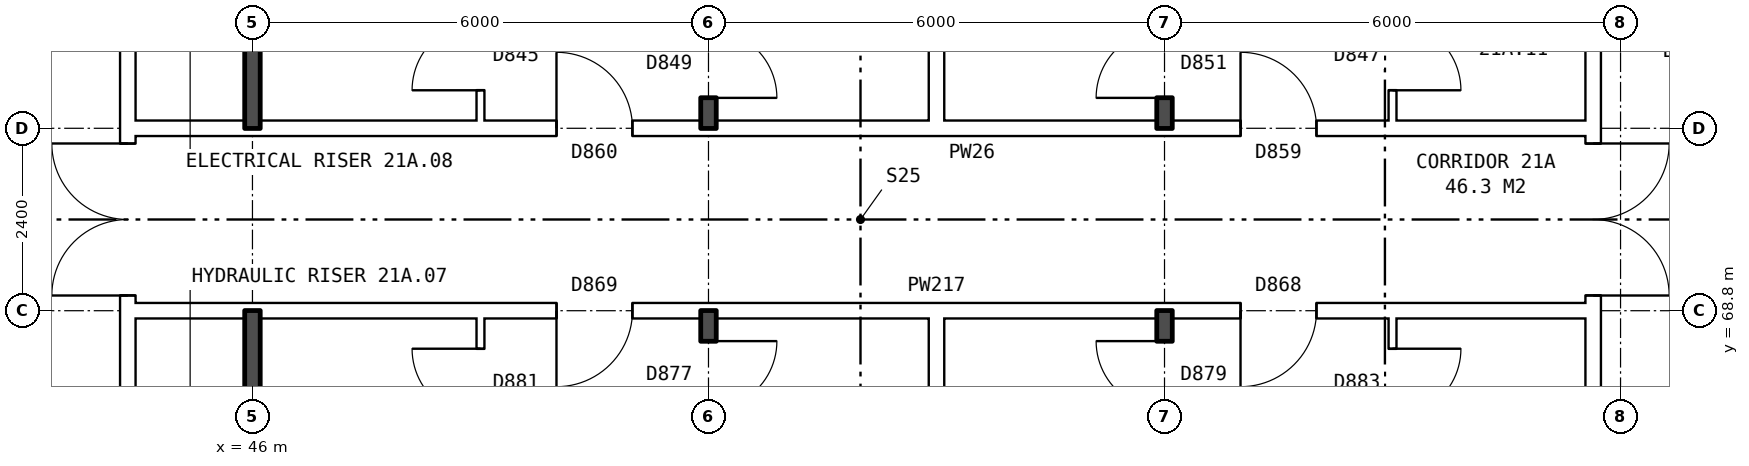
"""IFC4 building model, lengths in metres.
Left out: names, types, materials, properties, quantities, classifications, styles, units other than length and angle.
Written with IfcOpenShell. Run it as: python <this file> out.ifc"""

import sys

from ifc_helpers import new_model, si_unit, direction, frame, frame_2d, origin, place, context, subcontext, project, spatial, rectangle, extrude, element, fill, save


model = new_model("IFC4")
c1 = context("Model", 3, precision=1e-05, world=origin(), true_north=direction((0.0, 1.0)))
c2 = subcontext(c1, "Body", "Model", "MODEL_VIEW")
j1 = project(units=[si_unit("LENGTHUNIT", "METRE"), si_unit("PLANEANGLEUNIT", "RADIAN")], contexts=[c1])
p1 = place(None, origin())
s1 = spatial("IfcSite", under=j1, at=p1, CompositionType="ELEMENT")
p2 = place(p1, origin())
s2 = spatial("IfcBuilding", under=s1, at=p2, CompositionType="ELEMENT")
p3 = place(p2, frame((0.0, 0.0, 77.8)))
s3 = spatial("IfcBuildingStorey", under=s2, at=p3, CompositionType="ELEMENT", Elevation=77.8)
p4 = place(p3, frame((63.64, 63.9, 0.0), z_axis=(0.0, 0.0, 1.0), x_axis=(0.0, 1.0, 0.0)))
e1 = element("IfcWall", 1, at=p4, inside=s3, PredefinedType="PARTITIONING", context=c2, shape_type="SweptSolid", body=[
    extrude(rectangle(XDim=12.2, YDim=0.2, at=frame_2d((6.1, 0.0))), origin(), (0.0, 0.0, 1.0), 2.85),
])
p5 = place(p4, frame((5.1, 0.0, 0.0)))
e2 = element("IfcOpeningElement", 2, at=p5, cuts=e1, PredefinedType="OPENING", context=c2, shape_type="SweptSolid", body=[
    extrude(rectangle(XDim=2.0, YDim=2.1, at=frame_2d((1.0, 1.05))), frame((0.0, 0.11, 0.0), z_axis=(0.0, -1.0, 0.0), x_axis=(1.0, 0.0, 0.0)), (0.0, 0.0, 1.0), 0.22),
])
p6 = place(p3, frame((44.36, 63.9, 0.0), z_axis=(0.0, 0.0, 1.0), x_axis=(0.0, 1.0, 0.0)))
e3 = element("IfcWall", 3, at=p6, inside=s3, PredefinedType="PARTITIONING", context=c2, shape_type="SweptSolid", body=[
    extrude(rectangle(XDim=12.2, YDim=0.2, at=frame_2d((6.1, 0.0))), origin(), (0.0, 0.0, 1.0), 2.85),
])
p7 = place(p6, frame((5.1, 0.0, 0.0)))
e4 = element("IfcOpeningElement", 4, at=p7, cuts=e3, PredefinedType="OPENING", context=c2, shape_type="SweptSolid", body=[
    extrude(rectangle(XDim=2.0, YDim=2.1, at=frame_2d((1.0, 1.05))), frame((0.0, 0.11, 0.0), z_axis=(0.0, -1.0, 0.0), x_axis=(1.0, 0.0, 0.0)), (0.0, 0.0, 1.0), 0.22),
])
p8 = place(p3, frame((44.36, 68.8, 0.0), z_axis=(0.0, 0.0, 1.0), x_axis=(1.0, 0.0, 0.0)))
e5 = element("IfcWall", 5, at=p8, inside=s3, PredefinedType="PARTITIONING", context=c2, shape_type="SweptSolid", body=[
    extrude(rectangle(XDim=19.28, YDim=0.2, at=frame_2d((9.64, 0.0))), origin(), (0.0, 0.0, 1.0), 2.85),
])
p9 = place(p8, frame((14.64, 0.0, 0.0)))
e6 = element("IfcOpeningElement", 6, at=p9, cuts=e5, PredefinedType="OPENING", context=c2, shape_type="SweptSolid", body=[
    extrude(rectangle(XDim=1.0, YDim=2.1, at=frame_2d((0.5, 1.05))), frame((0.0, 0.11, 0.0), z_axis=(0.0, -1.0, 0.0), x_axis=(1.0, 0.0, 0.0)), (0.0, 0.0, 1.0), 0.22),
])
p10 = place(p8, frame((5.64, 0.0, 0.0)))
e7 = element("IfcOpeningElement", 7, at=p10, cuts=e5, PredefinedType="OPENING", context=c2, shape_type="SweptSolid", body=[
    extrude(rectangle(XDim=1.0, YDim=2.1, at=frame_2d((0.5, 1.05))), frame((0.0, 0.11, 0.0), z_axis=(0.0, -1.0, 0.0), x_axis=(1.0, 0.0, 0.0)), (0.0, 0.0, 1.0), 0.22),
])
p11 = place(p3, frame((44.36, 71.2, 0.0), z_axis=(0.0, 0.0, 1.0), x_axis=(1.0, 0.0, 0.0)))
e8 = element("IfcWall", 8, at=p11, inside=s3, PredefinedType="PARTITIONING", context=c2, shape_type="SweptSolid", body=[
    extrude(rectangle(XDim=19.28, YDim=0.2, at=frame_2d((9.64, 0.0))), origin(), (0.0, 0.0, 1.0), 2.85),
])
p12 = place(p11, frame((14.64, 0.0, 0.0)))
e9 = element("IfcOpeningElement", 9, at=p12, cuts=e8, PredefinedType="OPENING", context=c2, shape_type="SweptSolid", body=[
    extrude(rectangle(XDim=1.0, YDim=2.1, at=frame_2d((0.5, 1.05))), frame((0.0, 0.11, 0.0), z_axis=(0.0, -1.0, 0.0), x_axis=(1.0, 0.0, 0.0)), (0.0, 0.0, 1.0), 0.22),
])
p13 = place(p11, frame((5.64, 0.0, 0.0)))
e10 = element("IfcOpeningElement", 10, at=p13, cuts=e8, PredefinedType="OPENING", context=c2, shape_type="SweptSolid", body=[
    extrude(rectangle(XDim=1.0, YDim=2.1, at=frame_2d((0.5, 1.05))), frame((0.0, 0.11, 0.0), z_axis=(0.0, -1.0, 0.0), x_axis=(1.0, 0.0, 0.0)), (0.0, 0.0, 1.0), 0.22),
])
for number, where, z_axis, x_axis in (
    (11, (46.0, 63.8, 0.0), (0.0, 0.0, 1.0), (0.0, 1.0, 0.0)),
    (12, (46.0, 71.2, 0.0), (0.0, 0.0, 1.0), (0.0, 1.0, 0.0)),
):
    element("IfcWall", number, at=place(p3, frame(where, z_axis=z_axis, x_axis=x_axis)), inside=s3, PredefinedType="SOLIDWALL", context=c2, shape_type="SweptSolid", body=[
        extrude(rectangle(XDim=5.0, YDim=0.2, at=frame_2d((2.5, 0.0))), origin(), (0.0, 0.0, 1.0), 2.85),
    ])
p14 = place(p3, frame((49.0, 54.36, 0.0), z_axis=(0.0, 0.0, 1.0), x_axis=(0.0, 1.0, 0.0)))
e13 = element("IfcWall", 13, at=p14, inside=s3, PredefinedType="PARTITIONING", context=c2, shape_type="SweptSolid", body=[
    extrude(rectangle(XDim=14.34, YDim=0.1, at=frame_2d((7.17, 0.0))), origin(), (0.0, 0.0, 1.0), 2.85),
])
p15 = place(p14, frame((6.7, 0.0, 0.0)))
e14 = element("IfcOpeningElement", 14, at=p15, cuts=e13, PredefinedType="OPENING", context=c2, shape_type="SweptSolid", body=[
    extrude(rectangle(XDim=0.9, YDim=2.1, at=frame_2d((0.45, 1.05))), frame((0.0, 0.06, 0.0), z_axis=(0.0, -1.0, 0.0), x_axis=(1.0, 0.0, 0.0)), (0.0, 0.0, 1.0), 0.12),
])
p16 = place(p14, frame((13.04, 0.0, 0.0)))
e15 = element("IfcOpeningElement", 15, at=p16, cuts=e13, PredefinedType="OPENING", context=c2, shape_type="SweptSolid", body=[
    extrude(rectangle(XDim=0.9, YDim=2.1, at=frame_2d((0.45, 1.05))), frame((0.0, 0.06, 0.0), z_axis=(0.0, -1.0, 0.0), x_axis=(1.0, 0.0, 0.0)), (0.0, 0.0, 1.0), 0.12),
])
p17 = place(p3, frame((49.0, 71.3, 0.0), z_axis=(0.0, 0.0, 1.0), x_axis=(0.0, 1.0, 0.0)))
e16 = element("IfcWall", 16, at=p17, inside=s3, PredefinedType="PARTITIONING", context=c2, shape_type="SweptSolid", body=[
    extrude(rectangle(XDim=14.34, YDim=0.1, at=frame_2d((7.17, 0.0))), origin(), (0.0, 0.0, 1.0), 2.85),
])
p18 = place(p17, frame((5.74, 0.0, 0.0)))
e17 = element("IfcOpeningElement", 17, at=p18, cuts=e16, PredefinedType="OPENING", context=c2, shape_type="SweptSolid", body=[
    extrude(rectangle(XDim=0.9, YDim=2.1, at=frame_2d((0.45, 1.05))), frame((0.0, 0.06, 0.0), z_axis=(0.0, -1.0, 0.0), x_axis=(1.0, 0.0, 0.0)), (0.0, 0.0, 1.0), 0.12),
])
p19 = place(p17, frame((0.4, 0.0, 0.0)))
e18 = element("IfcOpeningElement", 18, at=p19, cuts=e16, PredefinedType="OPENING", context=c2, shape_type="SweptSolid", body=[
    extrude(rectangle(XDim=0.9, YDim=2.1, at=frame_2d((0.45, 1.05))), frame((0.0, 0.06, 0.0), z_axis=(0.0, -1.0, 0.0), x_axis=(1.0, 0.0, 0.0)), (0.0, 0.0, 1.0), 0.12),
])
p20 = place(p3, frame((52.0, 54.36, 0.0), z_axis=(0.0, 0.0, 1.0), x_axis=(0.0, 1.0, 0.0)))
e19 = element("IfcWall", 19, at=p20, inside=s3, PredefinedType="SOLIDWALL", context=c2, shape_type="SweptSolid", body=[
    extrude(rectangle(XDim=14.44, YDim=0.2, at=frame_2d((7.22, 0.0))), origin(), (0.0, 0.0, 1.0), 2.85),
])
p21 = place(p20, frame((6.7, 0.0, 0.0)))
e20 = element("IfcOpeningElement", 20, at=p21, cuts=e19, PredefinedType="OPENING", context=c2, shape_type="SweptSolid", body=[
    extrude(rectangle(XDim=0.9, YDim=2.1, at=frame_2d((0.45, 1.05))), frame((0.0, 0.11, 0.0), z_axis=(0.0, -1.0, 0.0), x_axis=(1.0, 0.0, 0.0)), (0.0, 0.0, 1.0), 0.22),
])
p22 = place(p20, frame((13.14, 0.0, 0.0)))
e21 = element("IfcOpeningElement", 21, at=p22, cuts=e19, PredefinedType="OPENING", context=c2, shape_type="SweptSolid", body=[
    extrude(rectangle(XDim=0.9, YDim=2.1, at=frame_2d((0.45, 1.05))), frame((0.0, 0.11, 0.0), z_axis=(0.0, -1.0, 0.0), x_axis=(1.0, 0.0, 0.0)), (0.0, 0.0, 1.0), 0.22),
])
p23 = place(p3, frame((52.0, 71.2, 0.0), z_axis=(0.0, 0.0, 1.0), x_axis=(0.0, 1.0, 0.0)))
e22 = element("IfcWall", 22, at=p23, inside=s3, PredefinedType="SOLIDWALL", context=c2, shape_type="SweptSolid", body=[
    extrude(rectangle(XDim=14.44, YDim=0.2, at=frame_2d((7.22, 0.0))), origin(), (0.0, 0.0, 1.0), 2.85),
])
p24 = place(p23, frame((5.84, 0.0, 0.0)))
e23 = element("IfcOpeningElement", 23, at=p24, cuts=e22, PredefinedType="OPENING", context=c2, shape_type="SweptSolid", body=[
    extrude(rectangle(XDim=0.9, YDim=2.1, at=frame_2d((0.45, 1.05))), frame((0.0, 0.11, 0.0), z_axis=(0.0, -1.0, 0.0), x_axis=(1.0, 0.0, 0.0)), (0.0, 0.0, 1.0), 0.22),
])
p25 = place(p23, frame((0.4, 0.0, 0.0)))
e24 = element("IfcOpeningElement", 24, at=p25, cuts=e22, PredefinedType="OPENING", context=c2, shape_type="SweptSolid", body=[
    extrude(rectangle(XDim=0.9, YDim=2.1, at=frame_2d((0.45, 1.05))), frame((0.0, 0.11, 0.0), z_axis=(0.0, -1.0, 0.0), x_axis=(1.0, 0.0, 0.0)), (0.0, 0.0, 1.0), 0.22),
])
for number, where, z_axis, x_axis in (
    (25, (55.0, 54.36, 0.0), (0.0, 0.0, 1.0), (0.0, 1.0, 0.0)),
    (26, (55.0, 71.3, 0.0), (0.0, 0.0, 1.0), (0.0, 1.0, 0.0)),
):
    element("IfcWall", number, at=place(p3, frame(where, z_axis=z_axis, x_axis=x_axis)), inside=s3, PredefinedType="PARTITIONING", context=c2, shape_type="SweptSolid", body=[
        extrude(rectangle(XDim=14.34, YDim=0.2, at=frame_2d((7.17, 0.0))), origin(), (0.0, 0.0, 1.0), 2.85),
    ])
p26 = place(p3, frame((58.0, 54.36, 0.0), z_axis=(0.0, 0.0, 1.0), x_axis=(0.0, 1.0, 0.0)))
e27 = element("IfcWall", 27, at=p26, inside=s3, PredefinedType="SOLIDWALL", context=c2, shape_type="SweptSolid", body=[
    extrude(rectangle(XDim=14.44, YDim=0.2, at=frame_2d((7.22, 0.0))), origin(), (0.0, 0.0, 1.0), 2.85),
])
p27 = place(p26, frame((7.7, 0.0, 0.0)))
e28 = element("IfcOpeningElement", 28, at=p27, cuts=e27, PredefinedType="OPENING", context=c2, shape_type="SweptSolid", body=[
    extrude(rectangle(XDim=0.9, YDim=2.1, at=frame_2d((0.45, 1.05))), frame((0.0, 0.11, 0.0), z_axis=(0.0, -1.0, 0.0), x_axis=(1.0, 0.0, 0.0)), (0.0, 0.0, 1.0), 0.22),
])
p28 = place(p26, frame((13.14, 0.0, 0.0)))
e29 = element("IfcOpeningElement", 29, at=p28, cuts=e27, PredefinedType="OPENING", context=c2, shape_type="SweptSolid", body=[
    extrude(rectangle(XDim=0.9, YDim=2.1, at=frame_2d((0.45, 1.05))), frame((0.0, 0.11, 0.0), z_axis=(0.0, -1.0, 0.0), x_axis=(1.0, 0.0, 0.0)), (0.0, 0.0, 1.0), 0.22),
])
p29 = place(p3, frame((58.0, 71.2, 0.0), z_axis=(0.0, 0.0, 1.0), x_axis=(0.0, 1.0, 0.0)))
e30 = element("IfcWall", 30, at=p29, inside=s3, PredefinedType="SOLIDWALL", context=c2, shape_type="SweptSolid", body=[
    extrude(rectangle(XDim=14.44, YDim=0.2, at=frame_2d((7.22, 0.0))), origin(), (0.0, 0.0, 1.0), 2.85),
])
p30 = place(p29, frame((8.04, 0.0, 0.0)))
e31 = element("IfcOpeningElement", 31, at=p30, cuts=e30, PredefinedType="OPENING", context=c2, shape_type="SweptSolid", body=[
    extrude(rectangle(XDim=0.9, YDim=2.1, at=frame_2d((0.45, 1.05))), frame((0.0, 0.11, 0.0), z_axis=(0.0, -1.0, 0.0), x_axis=(1.0, 0.0, 0.0)), (0.0, 0.0, 1.0), 0.22),
])
p31 = place(p29, frame((0.4, 0.0, 0.0)))
e32 = element("IfcOpeningElement", 32, at=p31, cuts=e30, PredefinedType="OPENING", context=c2, shape_type="SweptSolid", body=[
    extrude(rectangle(XDim=0.9, YDim=2.1, at=frame_2d((0.45, 1.05))), frame((0.0, 0.11, 0.0), z_axis=(0.0, -1.0, 0.0), x_axis=(1.0, 0.0, 0.0)), (0.0, 0.0, 1.0), 0.22),
])
p32 = place(p3, frame((61.0, 54.36, 0.0), z_axis=(0.0, 0.0, 1.0), x_axis=(0.0, 1.0, 0.0)))
e33 = element("IfcWall", 33, at=p32, inside=s3, PredefinedType="PARTITIONING", context=c2, shape_type="SweptSolid", body=[
    extrude(rectangle(XDim=14.34, YDim=0.1, at=frame_2d((7.17, 0.0))), origin(), (0.0, 0.0, 1.0), 2.85),
])
p33 = place(p32, frame((7.7, 0.0, 0.0)))
e34 = element("IfcOpeningElement", 34, at=p33, cuts=e33, PredefinedType="OPENING", context=c2, shape_type="SweptSolid", body=[
    extrude(rectangle(XDim=0.9, YDim=2.1, at=frame_2d((0.45, 1.05))), frame((0.0, 0.06, 0.0), z_axis=(0.0, -1.0, 0.0), x_axis=(1.0, 0.0, 0.0)), (0.0, 0.0, 1.0), 0.12),
])
p34 = place(p32, frame((13.04, 0.0, 0.0)))
e35 = element("IfcOpeningElement", 35, at=p34, cuts=e33, PredefinedType="OPENING", context=c2, shape_type="SweptSolid", body=[
    extrude(rectangle(XDim=0.9, YDim=2.1, at=frame_2d((0.45, 1.05))), frame((0.0, 0.06, 0.0), z_axis=(0.0, -1.0, 0.0), x_axis=(1.0, 0.0, 0.0)), (0.0, 0.0, 1.0), 0.12),
])
p35 = place(p3, frame((61.0, 71.3, 0.0), z_axis=(0.0, 0.0, 1.0), x_axis=(0.0, 1.0, 0.0)))
e36 = element("IfcWall", 36, at=p35, inside=s3, PredefinedType="PARTITIONING", context=c2, shape_type="SweptSolid", body=[
    extrude(rectangle(XDim=14.34, YDim=0.1, at=frame_2d((7.17, 0.0))), origin(), (0.0, 0.0, 1.0), 2.85),
])
p36 = place(p35, frame((7.94, 0.0, 0.0)))
e37 = element("IfcOpeningElement", 37, at=p36, cuts=e36, PredefinedType="OPENING", context=c2, shape_type="SweptSolid", body=[
    extrude(rectangle(XDim=0.9, YDim=2.1, at=frame_2d((0.45, 1.05))), frame((0.0, 0.06, 0.0), z_axis=(0.0, -1.0, 0.0), x_axis=(1.0, 0.0, 0.0)), (0.0, 0.0, 1.0), 0.12),
])
p37 = place(p35, frame((0.4, 0.0, 0.0)))
e38 = element("IfcOpeningElement", 38, at=p37, cuts=e36, PredefinedType="OPENING", context=c2, shape_type="SweptSolid", body=[
    extrude(rectangle(XDim=0.9, YDim=2.1, at=frame_2d((0.45, 1.05))), frame((0.0, 0.06, 0.0), z_axis=(0.0, -1.0, 0.0), x_axis=(1.0, 0.0, 0.0)), (0.0, 0.0, 1.0), 0.12),
])
p38 = place(p5, frame((2.0, 0.0, 0.0), z_axis=(0.0, 0.0, 1.0), x_axis=(-1.0, 0.0, 0.0)))
e39 = element("IfcDoor", 39, at=p38, inside=s3, OperationType="DOUBLE_DOOR_SINGLE_SWING", PredefinedType="DOOR", context=c2, shape_type="SweptSolid", body=[
    extrude(rectangle(XDim=2.0, YDim=2.1, at=frame_2d((1.0, 1.05))), frame((0.0, 0.025, 0.0), z_axis=(0.0, -1.0, 0.0), x_axis=(1.0, 0.0, 0.0)), (0.0, 0.0, 1.0), 0.05),
])
fill(e2, e39)
p39 = place(p7, origin())
e40 = element("IfcDoor", 40, at=p39, inside=s3, OperationType="DOUBLE_DOOR_SINGLE_SWING", PredefinedType="DOOR", context=c2, shape_type="SweptSolid", body=[
    extrude(rectangle(XDim=2.0, YDim=2.1, at=frame_2d((1.0, 1.05))), frame((0.0, 0.025, 0.0), z_axis=(0.0, -1.0, 0.0), x_axis=(1.0, 0.0, 0.0)), (0.0, 0.0, 1.0), 0.05),
])
fill(e4, e40)
p40 = place(p9, frame((1.0, 0.0, 0.0), z_axis=(0.0, 0.0, 1.0), x_axis=(-1.0, 0.0, 0.0)))
e41 = element("IfcDoor", 41, at=p40, inside=s3, OperationType="SINGLE_SWING_RIGHT", PredefinedType="DOOR", context=c2, shape_type="SweptSolid", body=[
    extrude(rectangle(XDim=1.0, YDim=2.1, at=frame_2d((0.5, 1.05))), frame((0.0, 0.025, 0.0), z_axis=(0.0, -1.0, 0.0), x_axis=(1.0, 0.0, 0.0)), (0.0, 0.0, 1.0), 0.05),
])
fill(e6, e41)
p41 = place(p34, frame((0.9, 0.0, 0.0), z_axis=(0.0, 0.0, 1.0), x_axis=(-1.0, 0.0, 0.0)))
e42 = element("IfcDoor", 42, at=p41, inside=s3, OperationType="SINGLE_SWING_LEFT", PredefinedType="DOOR", context=c2, shape_type="SweptSolid", body=[
    extrude(rectangle(XDim=0.9, YDim=2.1, at=frame_2d((0.45, 1.05))), frame((0.0, 0.025, 0.0), z_axis=(0.0, -1.0, 0.0), x_axis=(1.0, 0.0, 0.0)), (0.0, 0.0, 1.0), 0.05),
])
fill(e35, e42)
p42 = place(p28, origin())
e43 = element("IfcDoor", 43, at=p42, inside=s3, OperationType="SINGLE_SWING_RIGHT", PredefinedType="DOOR", context=c2, shape_type="SweptSolid", body=[
    extrude(rectangle(XDim=0.9, YDim=2.1, at=frame_2d((0.45, 1.05))), frame((0.0, 0.025, 0.0), z_axis=(0.0, -1.0, 0.0), x_axis=(1.0, 0.0, 0.0)), (0.0, 0.0, 1.0), 0.05),
])
fill(e29, e43)
p43 = place(p10, frame((1.0, 0.0, 0.0), z_axis=(0.0, 0.0, 1.0), x_axis=(-1.0, 0.0, 0.0)))
e44 = element("IfcDoor", 44, at=p43, inside=s3, OperationType="SINGLE_SWING_RIGHT", PredefinedType="DOOR", context=c2, shape_type="SweptSolid", body=[
    extrude(rectangle(XDim=1.0, YDim=2.1, at=frame_2d((0.5, 1.05))), frame((0.0, 0.025, 0.0), z_axis=(0.0, -1.0, 0.0), x_axis=(1.0, 0.0, 0.0)), (0.0, 0.0, 1.0), 0.05),
])
fill(e7, e44)
p44 = place(p22, frame((0.9, 0.0, 0.0), z_axis=(0.0, 0.0, 1.0), x_axis=(-1.0, 0.0, 0.0)))
e45 = element("IfcDoor", 45, at=p44, inside=s3, OperationType="SINGLE_SWING_LEFT", PredefinedType="DOOR", context=c2, shape_type="SweptSolid", body=[
    extrude(rectangle(XDim=0.9, YDim=2.1, at=frame_2d((0.45, 1.05))), frame((0.0, 0.025, 0.0), z_axis=(0.0, -1.0, 0.0), x_axis=(1.0, 0.0, 0.0)), (0.0, 0.0, 1.0), 0.05),
])
fill(e21, e45)
p45 = place(p16, origin())
e46 = element("IfcDoor", 46, at=p45, inside=s3, OperationType="SINGLE_SWING_RIGHT", PredefinedType="DOOR", context=c2, shape_type="SweptSolid", body=[
    extrude(rectangle(XDim=0.9, YDim=2.1, at=frame_2d((0.45, 1.05))), frame((0.0, 0.025, 0.0), z_axis=(0.0, -1.0, 0.0), x_axis=(1.0, 0.0, 0.0)), (0.0, 0.0, 1.0), 0.05),
])
fill(e15, e46)
p46 = place(p12, origin())
e47 = element("IfcDoor", 47, at=p46, inside=s3, OperationType="SINGLE_SWING_LEFT", PredefinedType="DOOR", context=c2, shape_type="SweptSolid", body=[
    extrude(rectangle(XDim=1.0, YDim=2.1, at=frame_2d((0.5, 1.05))), frame((0.0, 0.025, 0.0), z_axis=(0.0, -1.0, 0.0), x_axis=(1.0, 0.0, 0.0)), (0.0, 0.0, 1.0), 0.05),
])
fill(e9, e47)
p47 = place(p37, frame((0.9, 0.0, 0.0), z_axis=(0.0, 0.0, 1.0), x_axis=(-1.0, 0.0, 0.0)))
e48 = element("IfcDoor", 48, at=p47, inside=s3, OperationType="SINGLE_SWING_RIGHT", PredefinedType="DOOR", context=c2, shape_type="SweptSolid", body=[
    extrude(rectangle(XDim=0.9, YDim=2.1, at=frame_2d((0.45, 1.05))), frame((0.0, 0.025, 0.0), z_axis=(0.0, -1.0, 0.0), x_axis=(1.0, 0.0, 0.0)), (0.0, 0.0, 1.0), 0.05),
])
fill(e38, e48)
p48 = place(p31, origin())
e49 = element("IfcDoor", 49, at=p48, inside=s3, OperationType="SINGLE_SWING_LEFT", PredefinedType="DOOR", context=c2, shape_type="SweptSolid", body=[
    extrude(rectangle(XDim=0.9, YDim=2.1, at=frame_2d((0.45, 1.05))), frame((0.0, 0.025, 0.0), z_axis=(0.0, -1.0, 0.0), x_axis=(1.0, 0.0, 0.0)), (0.0, 0.0, 1.0), 0.05),
])
fill(e32, e49)
p49 = place(p13, origin())
e50 = element("IfcDoor", 50, at=p49, inside=s3, OperationType="SINGLE_SWING_LEFT", PredefinedType="DOOR", context=c2, shape_type="SweptSolid", body=[
    extrude(rectangle(XDim=1.0, YDim=2.1, at=frame_2d((0.5, 1.05))), frame((0.0, 0.025, 0.0), z_axis=(0.0, -1.0, 0.0), x_axis=(1.0, 0.0, 0.0)), (0.0, 0.0, 1.0), 0.05),
])
fill(e10, e50)
p50 = place(p25, frame((0.9, 0.0, 0.0), z_axis=(0.0, 0.0, 1.0), x_axis=(-1.0, 0.0, 0.0)))
e51 = element("IfcDoor", 51, at=p50, inside=s3, OperationType="SINGLE_SWING_RIGHT", PredefinedType="DOOR", context=c2, shape_type="SweptSolid", body=[
    extrude(rectangle(XDim=0.9, YDim=2.1, at=frame_2d((0.45, 1.05))), frame((0.0, 0.025, 0.0), z_axis=(0.0, -1.0, 0.0), x_axis=(1.0, 0.0, 0.0)), (0.0, 0.0, 1.0), 0.05),
])
fill(e24, e51)
p51 = place(p19, origin())
e52 = element("IfcDoor", 52, at=p51, inside=s3, OperationType="SINGLE_SWING_LEFT", PredefinedType="DOOR", context=c2, shape_type="SweptSolid", body=[
    extrude(rectangle(XDim=0.9, YDim=2.1, at=frame_2d((0.45, 1.05))), frame((0.0, 0.025, 0.0), z_axis=(0.0, -1.0, 0.0), x_axis=(1.0, 0.0, 0.0)), (0.0, 0.0, 1.0), 0.05),
])
fill(e18, e52)
save(model, sys.argv[1])
